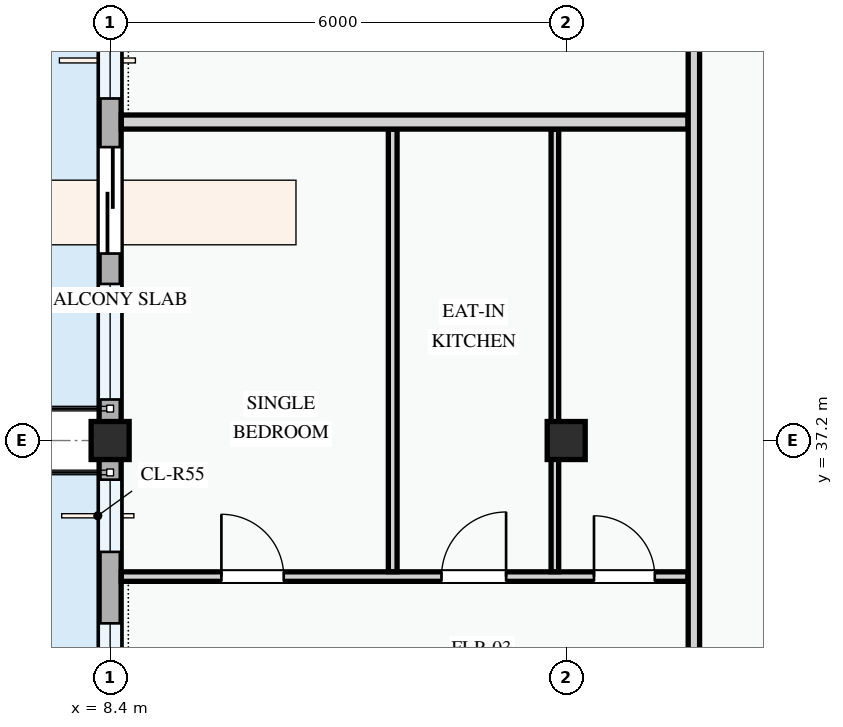
"""IFC4 building model, lengths in metres.
Left out: names, types, materials, properties, quantities, classifications, styles, units other than length and angle.
Written with IfcOpenShell. Run it as: python <this file> out.ifc"""

import sys

from ifc_helpers import new_model, si_unit, direction, frame, frame_2d, origin, origin_2d, place, context, subcontext, project, spatial, rectangle, extrude, element, fill, save


model = new_model("IFC4")
c1 = context("Model", 3, precision=1e-05, world=origin(), true_north=direction((0.0, 1.0)))
c2 = subcontext(c1, "Body", "Model", "MODEL_VIEW")
j1 = project(units=[si_unit("LENGTHUNIT", "METRE"), si_unit("PLANEANGLEUNIT", "RADIAN")], contexts=[c1])
p1 = place(None, origin())
s1 = spatial("IfcSite", under=j1, at=p1, CompositionType="ELEMENT")
p2 = place(p1, origin())
s2 = spatial("IfcBuilding", under=s1, at=p2, CompositionType="ELEMENT")
p3 = place(p2, frame((0.0, 0.0, 21.3)))
s3 = spatial("IfcBuildingStorey", under=s2, at=p3, CompositionType="ELEMENT", Elevation=21.3)
for number, where, z_axis, x_axis in (
    (1, (8.4, 37.2, 0.0), (0.0, 0.0, 1.0), (1.0, 0.0, 0.0)),
    (2, (14.4, 37.2, 0.0), (0.0, 0.0, 1.0), (1.0, 0.0, 0.0)),
):
    element("IfcColumn", number, at=place(p3, frame(where, z_axis=z_axis, x_axis=x_axis)), inside=s3, PredefinedType="COLUMN", context=c2, shape_type="SweptSolid", body=[
        extrude(rectangle(XDim=0.5, YDim=0.5, at=origin_2d()), origin(), (0.0, 0.0, 1.0), 3.3),
    ])
p4 = place(p3, frame((8.4, 43.2, 0.0), z_axis=(0.0, 0.0, 1.0), x_axis=(0.0, -1.0, 0.0)))
e3 = element("IfcWall", 3, at=p4, inside=s3, PredefinedType="STANDARD", context=c2, shape_type="SweptSolid", body=[
    extrude(rectangle(XDim=6.0, YDim=0.29, at=frame_2d((3.0, 0.0))), origin(), (0.0, 0.0, 1.0), 2.445),
])
p5 = place(p4, frame((2.14, 0.0, 0.0)))
e4 = element("IfcOpeningElement", 4, at=p5, cuts=e3, PredefinedType="OPENING", context=c2, shape_type="SweptSolid", body=[
    extrude(rectangle(XDim=1.4, YDim=2.2, at=frame_2d((0.7, 1.1))), frame((0.0, 0.155, 0.0), z_axis=(0.0, -1.0, 0.0), x_axis=(1.0, 0.0, 0.0)), (0.0, 0.0, 1.0), 0.31),
])
p6 = place(p4, frame((0.5, 0.0, 0.78)))
e5 = element("IfcOpeningElement", 5, at=p6, cuts=e3, PredefinedType="OPENING", context=c2, shape_type="SweptSolid", body=[
    extrude(rectangle(XDim=1.0, YDim=1.25, at=frame_2d((0.5, 0.625))), frame((0.0, 0.155, 0.0), z_axis=(0.0, -1.0, 0.0), x_axis=(1.0, 0.0, 0.0)), (0.0, 0.0, 1.0), 0.31),
])
p7 = place(p4, frame((3.94, 0.0, 0.78)))
e6 = element("IfcOpeningElement", 6, at=p7, cuts=e3, PredefinedType="OPENING", context=c2, shape_type="SweptSolid", body=[
    extrude(rectangle(XDim=1.52, YDim=1.42, at=frame_2d((0.76, 0.71))), frame((0.0, 0.155, 0.0), z_axis=(0.0, -1.0, 0.0), x_axis=(1.0, 0.0, 0.0)), (0.0, 0.0, 1.0), 0.31),
])
p8 = place(p3, frame((8.4, 37.2, 0.0), z_axis=(0.0, 0.0, 1.0), x_axis=(0.0, -1.0, 0.0)))
e7 = element("IfcWall", 7, at=p8, inside=s3, PredefinedType="STANDARD", context=c2, shape_type="SweptSolid", body=[
    extrude(rectangle(XDim=8.4, YDim=0.29, at=frame_2d((4.2, 0.0))), origin(), (0.0, 0.0, 1.0), 2.345),
])
p9 = place(p8, frame((5.69, 0.0, 0.0)))
e8 = element("IfcOpeningElement", 8, at=p9, cuts=e7, PredefinedType="OPENING", context=c2, shape_type="SweptSolid", body=[
    extrude(rectangle(XDim=1.5, YDim=2.2, at=frame_2d((0.75, 1.1))), frame((0.0, 0.155, 0.0), z_axis=(0.0, -1.0, 0.0), x_axis=(1.0, 0.0, 0.0)), (0.0, 0.0, 1.0), 0.31),
])
p10 = place(p8, frame((0.515, 0.0, 0.78)))
e9 = element("IfcOpeningElement", 9, at=p10, cuts=e7, PredefinedType="OPENING", context=c2, shape_type="SweptSolid", body=[
    extrude(rectangle(XDim=0.95, YDim=1.15, at=frame_2d((0.475, 0.575))), frame((0.0, 0.155, 0.0), z_axis=(0.0, -1.0, 0.0), x_axis=(1.0, 0.0, 0.0)), (0.0, 0.0, 1.0), 0.31),
])
p11 = place(p8, frame((2.405, 0.0, 0.78)))
e10 = element("IfcOpeningElement", 10, at=p11, cuts=e7, PredefinedType="OPENING", context=c2, shape_type="SweptSolid", body=[
    extrude(rectangle(XDim=1.75, YDim=1.45, at=frame_2d((0.875, 0.725))), frame((0.0, 0.155, 0.0), z_axis=(0.0, -1.0, 0.0), x_axis=(1.0, 0.0, 0.0)), (0.0, 0.0, 1.0), 0.31),
])
p12 = place(p3, frame((8.547, 35.41, 0.0), z_axis=(0.0, 0.0, 1.0), x_axis=(1.0, 0.0, 0.0)))
e11 = element("IfcWall", 11, at=p12, inside=s3, PredefinedType="PARTITIONING", context=c2, shape_type="SweptSolid", body=[
    extrude(rectangle(XDim=7.456, YDim=0.125, at=frame_2d((3.728, 0.0))), origin(), (0.0, 0.0, 1.0), 3.0),
])
p13 = place(p12, frame((1.317, 0.0, 0.0)))
e12 = element("IfcOpeningElement", 12, at=p13, cuts=e11, PredefinedType="OPENING", context=c2, shape_type="SweptSolid", body=[
    extrude(rectangle(XDim=0.82, YDim=2.08, at=frame_2d((0.41, 1.04))), frame((0.0, 0.073, 0.0), z_axis=(0.0, -1.0, 0.0), x_axis=(1.0, 0.0, 0.0)), (0.0, 0.0, 1.0), 0.145),
])
p14 = place(p12, frame((4.212, 0.0, 0.0)))
e13 = element("IfcOpeningElement", 13, at=p14, cuts=e11, PredefinedType="OPENING", context=c2, shape_type="SweptSolid", body=[
    extrude(rectangle(XDim=0.85, YDim=2.1, at=frame_2d((0.425, 1.05))), frame((0.0, 0.073, 0.0), z_axis=(0.0, -1.0, 0.0), x_axis=(1.0, 0.0, 0.0)), (0.0, 0.0, 1.0), 0.145),
])
p15 = place(p12, frame((6.219, 0.0, 0.0)))
e14 = element("IfcOpeningElement", 14, at=p15, cuts=e11, PredefinedType="OPENING", context=c2, shape_type="SweptSolid", body=[
    extrude(rectangle(XDim=0.8, YDim=2.1, at=frame_2d((0.4, 1.05))), frame((0.0, 0.073, 0.0), z_axis=(0.0, -1.0, 0.0), x_axis=(1.0, 0.0, 0.0)), (0.0, 0.0, 1.0), 0.145),
])
p16 = place(p3, frame((12.118, 35.475, 0.0), z_axis=(0.0, 0.0, 1.0), x_axis=(0.0, 1.0, 0.0)))
e15 = element("IfcWall", 15, at=p16, inside=s3, PredefinedType="PARTITIONING", context=c2, shape_type="SweptSolid", body=[
    extrude(rectangle(XDim=5.821, YDim=0.115, at=frame_2d((2.91, 0.0))), origin(), (0.0, 0.0, 1.0), 3.0),
])
p17 = place(p3, frame((14.251, 35.475, 0.0), z_axis=(0.0, 0.0, 1.0), x_axis=(0.0, 1.0, 0.0)))
e16 = element("IfcWall", 16, at=p17, inside=s3, PredefinedType="PARTITIONING", context=c2, shape_type="SweptSolid", body=[
    extrude(rectangle(XDim=5.821, YDim=0.1, at=frame_2d((2.91, 0.0))), origin(), (0.0, 0.0, 1.0), 2.425),
])
p18 = place(p3, frame((8.547, 41.39, 0.0), z_axis=(0.0, 0.0, 1.0), x_axis=(1.0, 0.0, 0.0)))
e17 = element("IfcWall", 17, at=p18, inside=s3, PredefinedType="PARTITIONING", context=c2, shape_type="SweptSolid", body=[
    extrude(rectangle(XDim=7.456, YDim=0.185, at=frame_2d((3.728, 0.0))), origin(), (0.0, 0.0, 1.0), 3.0),
])
p19 = place(p3, frame((16.08, 22.66, 0.0), z_axis=(0.0, 0.0, 1.0), x_axis=(0.0, 1.0, 0.0)))
e18 = element("IfcWall", 18, at=p19, inside=s3, PredefinedType="PARTITIONING", context=c2, shape_type="SweptSolid", body=[
    extrude(rectangle(XDim=34.793, YDim=0.15, at=frame_2d((17.396, 0.0))), origin(), (0.0, 0.0, 1.0), 3.0),
])
p20 = place(p19, frame((2.627, 0.0, 0.0)))
e19 = element("IfcOpeningElement", 19, at=p20, cuts=e18, PredefinedType="OPENING", context=c2, shape_type="SweptSolid", body=[
    extrude(rectangle(XDim=0.92, YDim=2.1, at=frame_2d((0.46, 1.05))), frame((0.0, 0.085, 0.0), z_axis=(0.0, -1.0, 0.0), x_axis=(1.0, 0.0, 0.0)), (0.0, 0.0, 1.0), 0.17),
])
p21 = place(p19, frame((10.02, 0.0, 0.0)))
e20 = element("IfcOpeningElement", 20, at=p21, cuts=e18, PredefinedType="OPENING", context=c2, shape_type="SweptSolid", body=[
    extrude(rectangle(XDim=0.92, YDim=2.1, at=frame_2d((0.46, 1.05))), frame((0.0, 0.085, 0.0), z_axis=(0.0, -1.0, 0.0), x_axis=(1.0, 0.0, 0.0)), (0.0, 0.0, 1.0), 0.17),
])
p22 = place(p19, frame((24.355, 0.0, 0.0)))
e21 = element("IfcOpeningElement", 21, at=p22, cuts=e18, PredefinedType="OPENING", context=c2, shape_type="SweptSolid", body=[
    extrude(rectangle(XDim=0.92, YDim=2.1, at=frame_2d((0.46, 1.05))), frame((0.0, 0.085, 0.0), z_axis=(0.0, -1.0, 0.0), x_axis=(1.0, 0.0, 0.0)), (0.0, 0.0, 1.0), 0.17),
])
p23 = place(p5, frame((1.4, 0.0, 0.0), z_axis=(0.0, 0.0, 1.0), x_axis=(-1.0, 0.0, 0.0)))
e22 = element("IfcDoor", 22, at=p23, inside=s3, OperationType="SLIDING_TO_LEFT", PredefinedType="DOOR", context=c2, shape_type="SweptSolid", body=[
    extrude(rectangle(XDim=1.4, YDim=2.2, at=frame_2d((0.7, 1.1))), frame((0.0, 0.025, 0.0), z_axis=(0.0, -1.0, 0.0), x_axis=(1.0, 0.0, 0.0)), (0.0, 0.0, 1.0), 0.05),
])
fill(e4, e22)
p24 = place(p6, origin())
e23 = element("IfcWindow", 23, at=p24, inside=s3, PartitioningType="SINGLE_PANEL", PredefinedType="WINDOW", context=c2, shape_type="SweptSolid", body=[
    extrude(rectangle(XDim=1.0, YDim=1.25, at=frame_2d((0.5, 0.625))), frame((0.0, 0.03, 0.0), z_axis=(0.0, -1.0, 0.0), x_axis=(1.0, 0.0, 0.0)), (0.0, 0.0, 1.0), 0.06),
])
fill(e5, e23)
p25 = place(p7, origin())
e24 = element("IfcWindow", 24, at=p25, inside=s3, PartitioningType="SINGLE_PANEL", PredefinedType="WINDOW", context=c2, shape_type="SweptSolid", body=[
    extrude(rectangle(XDim=1.52, YDim=1.42, at=frame_2d((0.76, 0.71))), frame((0.0, 0.03, 0.0), z_axis=(0.0, -1.0, 0.0), x_axis=(1.0, 0.0, 0.0)), (0.0, 0.0, 1.0), 0.06),
])
fill(e6, e24)
p26 = place(p10, origin())
e25 = element("IfcWindow", 25, at=p26, inside=s3, PartitioningType="SINGLE_PANEL", PredefinedType="WINDOW", context=c2, shape_type="SweptSolid", body=[
    extrude(rectangle(XDim=0.95, YDim=1.15, at=frame_2d((0.475, 0.575))), frame((0.0, 0.03, 0.0), z_axis=(0.0, -1.0, 0.0), x_axis=(1.0, 0.0, 0.0)), (0.0, 0.0, 1.0), 0.06),
])
fill(e9, e25)
p27 = place(p11, origin())
e26 = element("IfcWindow", 26, at=p27, inside=s3, PartitioningType="DOUBLE_PANEL_VERTICAL", PredefinedType="WINDOW", context=c2, shape_type="SweptSolid", body=[
    extrude(rectangle(XDim=1.75, YDim=1.45, at=frame_2d((0.875, 0.725))), frame((0.0, 0.03, 0.0), z_axis=(0.0, -1.0, 0.0), x_axis=(1.0, 0.0, 0.0)), (0.0, 0.0, 1.0), 0.06),
])
fill(e10, e26)
p28 = place(p13, origin())
e27 = element("IfcDoor", 27, at=p28, inside=s3, OperationType="SINGLE_SWING_LEFT", PredefinedType="DOOR", context=c2, shape_type="SweptSolid", body=[
    extrude(rectangle(XDim=0.82, YDim=2.08, at=frame_2d((0.41, 1.04))), frame((0.0, 0.025, 0.0), z_axis=(0.0, -1.0, 0.0), x_axis=(1.0, 0.0, 0.0)), (0.0, 0.0, 1.0), 0.05),
])
fill(e12, e27)
p29 = place(p14, origin())
e28 = element("IfcDoor", 28, at=p29, inside=s3, OperationType="SINGLE_SWING_RIGHT", PredefinedType="DOOR", context=c2, shape_type="SweptSolid", body=[
    extrude(rectangle(XDim=0.85, YDim=2.1, at=frame_2d((0.425, 1.05))), frame((0.0, 0.025, 0.0), z_axis=(0.0, -1.0, 0.0), x_axis=(1.0, 0.0, 0.0)), (0.0, 0.0, 1.0), 0.05),
])
fill(e13, e28)
p30 = place(p15, origin())
e29 = element("IfcDoor", 29, at=p30, inside=s3, OperationType="SINGLE_SWING_LEFT", PredefinedType="DOOR", context=c2, shape_type="SweptSolid", body=[
    extrude(rectangle(XDim=0.8, YDim=2.1, at=frame_2d((0.4, 1.05))), frame((0.0, 0.025, 0.0), z_axis=(0.0, -1.0, 0.0), x_axis=(1.0, 0.0, 0.0)), (0.0, 0.0, 1.0), 0.05),
])
fill(e14, e29)
save(model, sys.argv[1])
